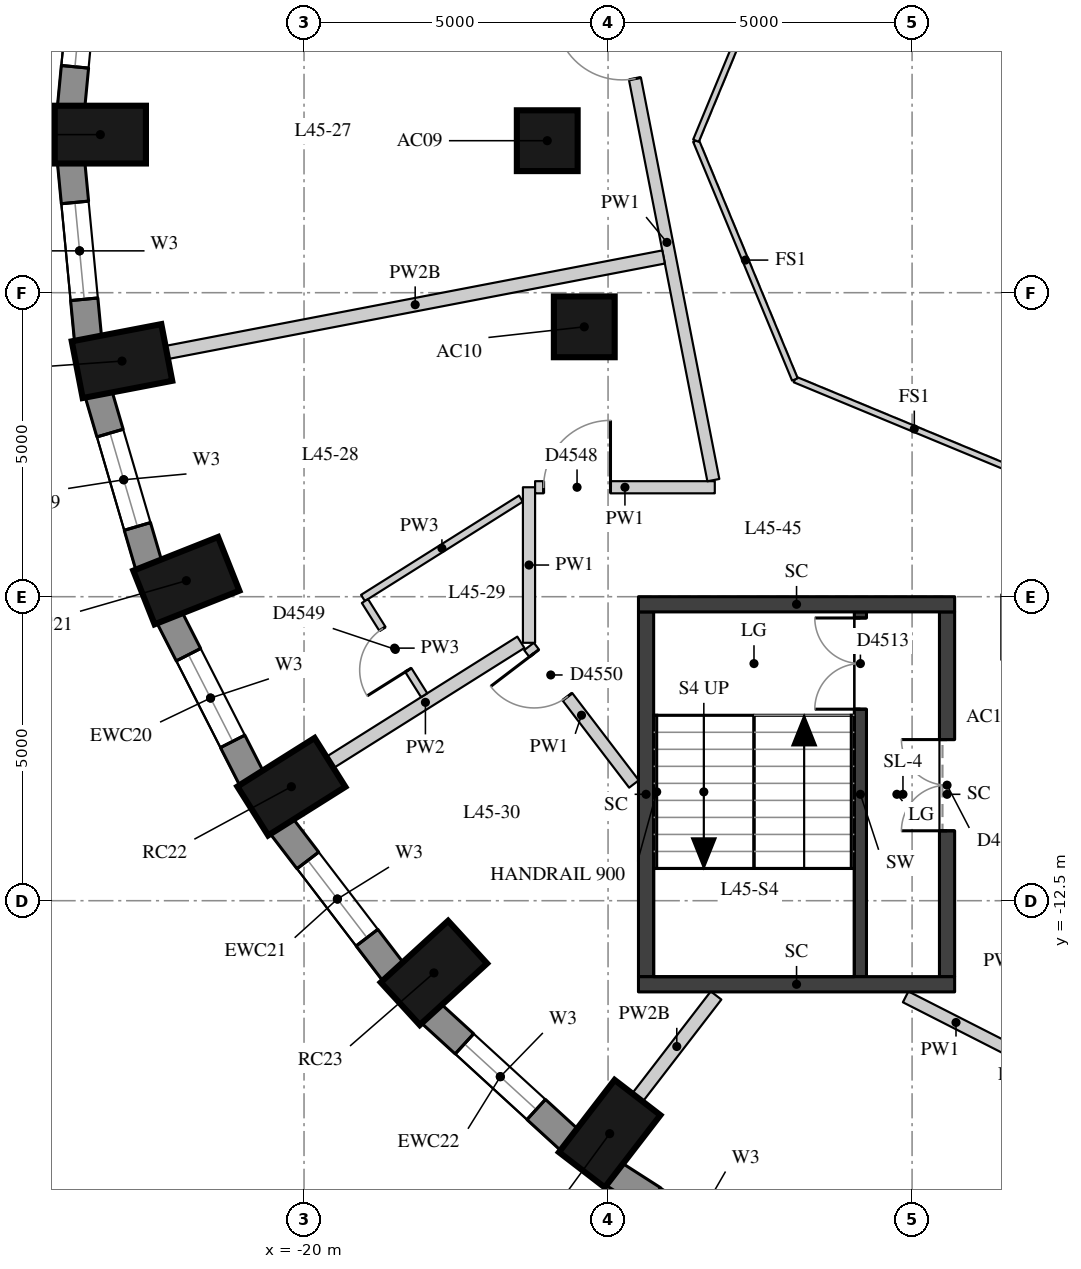
"""IFC4 building model, lengths in metres.
Left out: names, types, materials, properties, quantities, classifications, styles, units other than length and angle.
Written with IfcOpenShell. Run it as: python <this file> out.ifc"""

import sys

from ifc_helpers import new_model, si_unit, direction, frame, frame_2d, origin, origin_2d, place, context, subcontext, project, spatial, rectangle, extrude, element, fill, save


model = new_model("IFC4")
c1 = context("Model", 3, precision=1e-05, world=origin(), true_north=direction((0.0, 1.0)))
c2 = subcontext(c1, "Body", "Model", "MODEL_VIEW")
j1 = project(units=[si_unit("LENGTHUNIT", "METRE"), si_unit("PLANEANGLEUNIT", "RADIAN")], contexts=[c1])
p1 = place(None, origin())
s1 = spatial("IfcSite", under=j1, at=p1, CompositionType="ELEMENT")
p2 = place(p1, origin())
s2 = spatial("IfcBuilding", under=s1, at=p2, CompositionType="ELEMENT")
p3 = place(p2, frame((0.0, 0.0, 161.6)))
s3 = spatial("IfcBuildingStorey", under=s2, at=p3, CompositionType="ELEMENT", Elevation=161.6)
for number, where, z_axis, x_axis in (
    (1, (-23.35, 0.1, 0.0), (0.0, 0.0, 1.0), (-1.0, 0.0, 0.0)),
    (2, (-22.994, -3.625, 0.0), (0.0, 0.0, 1.0), (-0.982, -0.189, 0.0)),
    (3, (-21.936, -7.236, 0.0), (0.0, 0.0, 1.0), (-0.93, -0.369, 0.0)),
    (4, (-20.208, -10.625, 0.0), (0.0, 0.0, 1.0), (-0.846, -0.533, 0.0)),
    (5, (-17.864, -13.688, 0.0), (0.0, 0.0, 1.0), (-0.738, -0.675, 0.0)),
    (6, (-14.973, -16.332, 0.0), (0.0, 0.0, 1.0), (-0.61, -0.792, 0.0)),
):
    element("IfcColumn", number, at=place(p3, frame(where, z_axis=z_axis, x_axis=x_axis)), inside=s3, PredefinedType="COLUMN", context=c2, shape_type="SweptSolid", body=[
        extrude(rectangle(XDim=1.5, YDim=0.95, at=origin_2d()), origin(), (0.0, 0.0, 1.0), 3.3),
    ])
for number, where, z_axis, x_axis in (
    (7, (-16.0, 0.0, 0.0), (0.0, 0.0, 1.0), (1.0, 0.0, 0.0)),
    (8, (-15.391, -3.062, 0.0), (0.0, 0.0, 1.0), (1.0, 0.0, 0.0)),
):
    element("IfcColumn", number, at=place(p3, frame(where, z_axis=z_axis, x_axis=x_axis)), inside=s3, PredefinedType="COLUMN", context=c2, shape_type="SweptSolid", body=[
        extrude(rectangle(XDim=1.0, YDim=1.0, at=origin_2d()), origin(), (0.0, 0.0, 1.0), 3.3),
    ])
p4 = place(p3, frame((-23.552, 3.469, 0.0), z_axis=(0.0, 0.0, 1.0), x_axis=(-0.095265737322, -0.995451876935, 0.0)))
e9 = element("IfcWall", 9, at=p4, inside=s3, PredefinedType="SOLIDWALL", context=c2, shape_type="SweptSolid", body=[
    extrude(rectangle(XDim=2.927, YDim=0.45, at=frame_2d((1.463, 0.0))), origin(), (0.0, 0.0, 1.0), 3.02),
])
p5 = place(p4, frame((0.663, 0.0, 0.4)))
e10 = element("IfcOpeningElement", 10, at=p5, cuts=e9, PredefinedType="OPENING", context=c2, shape_type="SweptSolid", body=[
    extrude(rectangle(XDim=1.6, YDim=1.75, at=frame_2d((0.8, 0.875))), frame((0.0, 0.235, 0.0), z_axis=(0.0, -1.0, 0.0), x_axis=(1.0, 0.0, 0.0)), (0.0, 0.0, 1.0), 0.47),
])
p6 = place(p3, frame((-23.831, -0.355, 0.0), z_axis=(0.0, 0.0, 1.0), x_axis=(0.095257827044, -0.995452633924, 0.0)))
e11 = element("IfcWall", 11, at=p6, inside=s3, PredefinedType="SOLIDWALL", context=c2, shape_type="SweptSolid", body=[
    extrude(rectangle(XDim=2.927, YDim=0.45, at=frame_2d((1.463, 0.0))), origin(), (0.0, 0.0, 1.0), 3.02),
])
p7 = place(p6, frame((0.663, 0.0, 0.4)))
e12 = element("IfcOpeningElement", 12, at=p7, cuts=e11, PredefinedType="OPENING", context=c2, shape_type="SweptSolid", body=[
    extrude(rectangle(XDim=1.6, YDim=1.75, at=frame_2d((0.8, 0.875))), frame((0.0, 0.235, 0.0), z_axis=(0.0, -1.0, 0.0), x_axis=(1.0, 0.0, 0.0)), (0.0, 0.0, 1.0), 0.47),
])
p8 = place(p3, frame((-23.38, -4.162, 0.0), z_axis=(0.0, 0.0, 1.0), x_axis=(0.281125768296, -0.959670934435, 0.0)))
e13 = element("IfcWall", 13, at=p8, inside=s3, PredefinedType="SOLIDWALL", context=c2, shape_type="SweptSolid", body=[
    extrude(rectangle(XDim=2.948, YDim=0.45, at=frame_2d((1.474, 0.0))), origin(), (0.0, 0.0, 1.0), 3.02),
])
p9 = place(p8, frame((0.674, 0.0, 0.4)))
e14 = element("IfcOpeningElement", 14, at=p9, cuts=e13, PredefinedType="OPENING", context=c2, shape_type="SweptSolid", body=[
    extrude(rectangle(XDim=1.6, YDim=1.75, at=frame_2d((0.8, 0.875))), frame((0.0, 0.235, 0.0), z_axis=(0.0, -1.0, 0.0), x_axis=(1.0, 0.0, 0.0)), (0.0, 0.0, 1.0), 0.47),
])
p10 = place(p3, frame((-22.215, -7.837, 0.0), z_axis=(0.0, 0.0, 1.0), x_axis=(0.454133999889, -0.890933392653, 0.0)))
e15 = element("IfcWall", 15, at=p10, inside=s3, PredefinedType="SOLIDWALL", context=c2, shape_type="SweptSolid", body=[
    extrude(rectangle(XDim=2.986, YDim=0.45, at=frame_2d((1.493, 0.0))), origin(), (0.0, 0.0, 1.0), 3.02),
])
p11 = place(p10, frame((0.693, 0.0, 0.4)))
e16 = element("IfcOpeningElement", 16, at=p11, cuts=e15, PredefinedType="OPENING", context=c2, shape_type="SweptSolid", body=[
    extrude(rectangle(XDim=1.6, YDim=1.75, at=frame_2d((0.8, 0.875))), frame((0.0, 0.235, 0.0), z_axis=(0.0, -1.0, 0.0), x_axis=(1.0, 0.0, 0.0)), (0.0, 0.0, 1.0), 0.47),
])
p12 = place(p3, frame((-20.374, -11.267, 0.0), z_axis=(0.0, 0.0, 1.0), x_axis=(0.607817056371, -0.794077090706, 0.0)))
e17 = element("IfcWall", 17, at=p12, inside=s3, PredefinedType="SOLIDWALL", context=c2, shape_type="SweptSolid", body=[
    extrude(rectangle(XDim=3.037, YDim=0.45, at=frame_2d((1.519, 0.0))), origin(), (0.0, 0.0, 1.0), 3.02),
])
p13 = place(p12, frame((0.719, 0.0, 0.4)))
e18 = element("IfcOpeningElement", 18, at=p13, cuts=e17, PredefinedType="OPENING", context=c2, shape_type="SweptSolid", body=[
    extrude(rectangle(XDim=1.6, YDim=1.75, at=frame_2d((0.8, 0.875))), frame((0.0, 0.235, 0.0), z_axis=(0.0, -1.0, 0.0), x_axis=(1.0, 0.0, 0.0)), (0.0, 0.0, 1.0), 0.47),
])
p14 = place(p3, frame((-17.913, -14.35, 0.0), z_axis=(0.0, 0.0, 1.0), x_axis=(0.737808755941, -0.675009807082, 0.0)))
e19 = element("IfcWall", 19, at=p14, inside=s3, PredefinedType="SOLIDWALL", context=c2, shape_type="SweptSolid", body=[
    extrude(rectangle(XDim=3.094, YDim=0.45, at=frame_2d((1.547, 0.0))), origin(), (0.0, 0.0, 1.0), 3.02),
])
p15 = place(p14, frame((0.747, 0.0, 0.4)))
e20 = element("IfcOpeningElement", 20, at=p15, cuts=e19, PredefinedType="OPENING", context=c2, shape_type="SweptSolid", body=[
    extrude(rectangle(XDim=1.6, YDim=1.75, at=frame_2d((0.8, 0.875))), frame((0.0, 0.235, 0.0), z_axis=(0.0, -1.0, 0.0), x_axis=(1.0, 0.0, 0.0)), (0.0, 0.0, 1.0), 0.47),
])
p16 = place(p3, frame((-14.908, -16.993, 0.0), z_axis=(0.0, 0.0, 1.0), x_axis=(0.842065914439, -0.539374633943, 0.0)))
e21 = element("IfcWall", 21, at=p16, inside=s3, PredefinedType="SOLIDWALL", context=c2, shape_type="SweptSolid", body=[
    extrude(rectangle(XDim=3.151, YDim=0.45, at=frame_2d((1.576, 0.0))), origin(), (0.0, 0.0, 1.0), 3.02),
])
p17 = place(p16, frame((0.776, 0.0, 0.4)))
e22 = element("IfcOpeningElement", 22, at=p17, cuts=e21, PredefinedType="OPENING", context=c2, shape_type="SweptSolid", body=[
    extrude(rectangle(XDim=1.6, YDim=1.75, at=frame_2d((0.8, 0.875))), frame((0.0, 0.235, 0.0), z_axis=(0.0, -1.0, 0.0), x_axis=(1.0, 0.0, 0.0)), (0.0, 0.0, 1.0), 0.47),
])
p18 = place(p3, frame((-10.85, -13.75, 0.0), z_axis=(0.0, 0.0, 1.0), x_axis=(0.0, 1.0, 0.0)))
e23 = element("IfcWall", 23, at=p18, inside=s3, PredefinedType="SHEAR", context=c2, shape_type="SweptSolid", body=[
    extrude(rectangle(XDim=6.0, YDim=0.2, at=frame_2d((3.0, 0.0))), origin(), (0.0, 0.0, 1.0), 3.02),
])
p19 = place(p18, frame((4.4, 0.0, 0.0)))
e24 = element("IfcOpeningElement", 24, at=p19, cuts=e23, PredefinedType="OPENING", context=c2, shape_type="SweptSolid", body=[
    extrude(rectangle(XDim=1.5, YDim=2.1, at=frame_2d((0.75, 1.05))), frame((0.0, 0.11, 0.0), z_axis=(0.0, -1.0, 0.0), x_axis=(1.0, 0.0, 0.0)), (0.0, 0.0, 1.0), 0.22),
])
p20 = place(p3, frame((-14.375, -13.75, -0.28), z_axis=(0.0, 0.0, 1.0), x_axis=(0.0, 1.0, 0.0)))
e25 = element("IfcWall", 25, at=p20, inside=s3, PredefinedType="SHEAR", context=c2, shape_type="SweptSolid", body=[
    extrude(rectangle(XDim=6.0, YDim=0.25, at=frame_2d((3.0, 0.0))), origin(), (0.0, 0.0, 1.0), 3.3),
])
p21 = place(p3, frame((-9.425, -13.75, -0.28), z_axis=(0.0, 0.0, 1.0), x_axis=(0.0, 1.0, 0.0)))
e26 = element("IfcWall", 26, at=p21, inside=s3, PredefinedType="SHEAR", context=c2, shape_type="SweptSolid", body=[
    extrude(rectangle(XDim=6.0, YDim=0.25, at=frame_2d((3.0, 0.0))), origin(), (0.0, 0.0, 1.0), 3.3),
])
p22 = place(p21, frame((2.4, 0.0, 0.28)))
e27 = element("IfcOpeningElement", 27, at=p22, cuts=e26, PredefinedType="OPENING", context=c2, shape_type="SweptSolid", body=[
    extrude(rectangle(XDim=1.5, YDim=2.1, at=frame_2d((0.75, 1.05))), frame((0.0, 0.135, 0.0), z_axis=(0.0, -1.0, 0.0), x_axis=(1.0, 0.0, 0.0)), (0.0, 0.0, 1.0), 0.27),
])
for number, where, z_axis, x_axis in (
    (28, (-14.5, -7.625, -0.28), (0.0, 0.0, 1.0), (1.0, 0.0, 0.0)),
    (29, (-14.5, -13.875, -0.28), (0.0, 0.0, 1.0), (1.0, 0.0, 0.0)),
):
    element("IfcWall", number, at=place(p3, frame(where, z_axis=z_axis, x_axis=x_axis)), inside=s3, PredefinedType="SHEAR", context=c2, shape_type="SweptSolid", body=[
        extrude(rectangle(XDim=5.2, YDim=0.25, at=frame_2d((2.6, 0.0))), origin(), (0.0, 0.0, 1.0), 3.3),
    ])
p23 = place(p3, frame((-8.449, -14.925, 0.0), z_axis=(0.0, 0.0, 1.0), x_axis=(-0.891172770552, 0.45366407509, 0.0)))
e30 = element("IfcWall", 30, at=p23, inside=s3, PredefinedType="PARTITIONING", context=c2, shape_type="SweptSolid", body=[
    extrude(rectangle(XDim=1.859, YDim=0.2, at=frame_2d((0.929, 0.0))), origin(), (0.0, 0.0, 1.0), 3.02),
])
p24 = place(p3, frame((-14.574, -10.58, 0.0), z_axis=(0.0, 0.0, 1.0), x_axis=(-0.606733250298, 0.794905505694, 0.0)))
e31 = element("IfcWall", 31, at=p24, inside=s3, PredefinedType="PARTITIONING", context=c2, shape_type="SweptSolid", body=[
    extrude(rectangle(XDim=2.845, YDim=0.2, at=frame_2d((1.423, 0.0))), origin(), (0.0, 0.0, 1.0), 3.02),
])
p25 = place(p24, frame((1.805, 0.0, 0.0)))
e32 = element("IfcOpeningElement", 32, at=p25, cuts=e31, PredefinedType="OPENING", context=c2, shape_type="SweptSolid", body=[
    extrude(rectangle(XDim=0.9, YDim=2.1, at=frame_2d((0.45, 1.05))), frame((0.0, 0.11, 0.0), z_axis=(0.0, -1.0, 0.0), x_axis=(1.0, 0.0, 0.0)), (0.0, 0.0, 1.0), 0.22),
])
p26 = place(p3, frame((-16.3, -8.258, 0.0), z_axis=(0.0, 0.0, 1.0), x_axis=(0.0, 1.0, 0.0)))
e33 = element("IfcWall", 33, at=p26, inside=s3, PredefinedType="PARTITIONING", context=c2, shape_type="SweptSolid", body=[
    extrude(rectangle(XDim=2.558, YDim=0.2, at=frame_2d((1.279, 0.0))), origin(), (0.0, 0.0, 1.0), 3.02),
])
p27 = place(p3, frame((-16.2, -5.7, 0.0), z_axis=(0.0, 0.0, 1.0), x_axis=(1.0, 0.0, 0.0)))
e34 = element("IfcWall", 34, at=p27, inside=s3, PredefinedType="PARTITIONING", context=c2, shape_type="SweptSolid", body=[
    extrude(rectangle(XDim=2.955, YDim=0.2, at=frame_2d((1.478, 0.0))), origin(), (0.0, 0.0, 1.0), 3.02),
])
p28 = place(p27, frame((0.14, 0.0, 0.0)))
e35 = element("IfcOpeningElement", 35, at=p28, cuts=e34, PredefinedType="OPENING", context=c2, shape_type="SweptSolid", body=[
    extrude(rectangle(XDim=1.1, YDim=2.1, at=frame_2d((0.55, 1.05))), frame((0.0, 0.11, 0.0), z_axis=(0.0, -1.0, 0.0), x_axis=(1.0, 0.0, 0.0)), (0.0, 0.0, 1.0), 0.22),
])
p29 = place(p3, frame((-13.268, -5.583, 0.0), z_axis=(0.0, 0.0, 1.0), x_axis=(-0.191747927029, 0.981444207523, 0.0)))
e36 = element("IfcWall", 36, at=p29, inside=s3, PredefinedType="PARTITIONING", context=c2, shape_type="SweptSolid", body=[
    extrude(rectangle(XDim=7.968, YDim=0.2, at=frame_2d((3.984, 0.0))), origin(), (0.0, 0.0, 1.0), 3.02),
])
p30 = place(p29, frame((6.728, 0.0, 0.0)))
e37 = element("IfcOpeningElement", 37, at=p30, cuts=e36, PredefinedType="OPENING", context=c2, shape_type="SweptSolid", body=[
    extrude(rectangle(XDim=1.1, YDim=2.1, at=frame_2d((0.55, 1.05))), frame((0.0, 0.11, 0.0), z_axis=(0.0, -1.0, 0.0), x_axis=(1.0, 0.0, 0.0)), (0.0, 0.0, 1.0), 0.22),
])
p31 = place(p3, frame((-22.257, -3.483, 0.0), z_axis=(0.0, 0.0, 1.0), x_axis=(0.982022559039, 0.188763591666, 0.0)))
e38 = element("IfcWall", 38, at=p31, inside=s3, PredefinedType="PARTITIONING", context=c2, shape_type="SweptSolid", body=[
    extrude(rectangle(XDim=8.32, YDim=0.22, at=frame_2d((4.16, 0.0))), origin(), (0.0, 0.0, 1.0), 2.57),
])
p32 = place(p3, frame((-19.573, -10.226, 0.0), z_axis=(0.0, 0.0, 1.0), x_axis=(0.846352613514, 0.53262299387, 0.0)))
e39 = element("IfcWall", 39, at=p32, inside=s3, PredefinedType="PARTITIONING", context=c2, shape_type="SweptSolid", body=[
    extrude(rectangle(XDim=3.71, YDim=0.22, at=frame_2d((1.855, 0.0))), origin(), (0.0, 0.0, 1.0), 3.02),
])
p33 = place(p3, frame((-14.516, -15.737, 0.0), z_axis=(0.0, 0.0, 1.0), x_axis=(0.609983624648, 0.792414019097, 0.0)))
e40 = element("IfcWall", 40, at=p33, inside=s3, PredefinedType="PARTITIONING", context=c2, shape_type="SweptSolid", body=[
    extrude(rectangle(XDim=2.118, YDim=0.22, at=frame_2d((1.059, 0.0))), origin(), (0.0, 0.0, 1.0), 2.57),
])
p34 = place(p3, frame((-16.434, -5.887, 0.0), z_axis=(0.0, 0.0, 1.0), x_axis=(-0.846389599206, -0.532564218058, 0.0)))
e41 = element("IfcWall", 41, at=p34, inside=s3, PredefinedType="PARTITIONING", context=c2, shape_type="SweptSolid", body=[
    extrude(rectangle(XDim=3.068, YDim=0.12, at=frame_2d((1.534, 0.0))), origin(), (0.0, 0.0, 1.0), 3.02),
])
p35 = place(p3, frame((-18.999, -7.571, 0.0), z_axis=(0.0, 0.0, 1.0), x_axis=(0.532431076319, -0.84647335987, 0.0)))
e42 = element("IfcWall", 42, at=p35, inside=s3, PredefinedType="PARTITIONING", context=c2, shape_type="SweptSolid", body=[
    extrude(rectangle(XDim=1.83, YDim=0.12, at=frame_2d((0.915, 0.0))), origin(), (0.0, 0.0, 1.0), 3.02),
])
p36 = place(p35, frame((0.54, 0.0, 0.0)))
e43 = element("IfcOpeningElement", 43, at=p36, cuts=e42, PredefinedType="OPENING", context=c2, shape_type="SweptSolid", body=[
    extrude(rectangle(XDim=0.8, YDim=2.1, at=frame_2d((0.4, 1.05))), frame((0.0, 0.07, 0.0), z_axis=(0.0, -1.0, 0.0), x_axis=(1.0, 0.0, 0.0)), (0.0, 0.0, 1.0), 0.14),
])
for number, where, z_axis, x_axis in (
    (44, (-8.0, -5.554, 0.0), (0.0, 0.0, 1.0), (-0.924, 0.383, 0.0)),
    (45, (-11.927, -3.927, 0.0), (0.0, 0.0, 1.0), (-0.383, 0.924, 0.0)),
    (46, (-13.554, 0.0, 0.0), (0.0, 0.0, 1.0), (0.383, 0.924, 0.0)),
):
    element("IfcWall", number, at=place(p3, frame(where, z_axis=z_axis, x_axis=x_axis)), inside=s3, PredefinedType="PARTITIONING", context=c2, shape_type="SweptSolid", body=[
        extrude(rectangle(XDim=4.251, YDim=0.1, at=frame_2d((2.125, 0.0))), origin(), (0.0, 0.0, 1.0), 3.02),
    ])
p37 = place(p5, origin())
e47 = element("IfcWindow", 47, at=p37, inside=s3, PartitioningType="SINGLE_PANEL", PredefinedType="WINDOW", context=c2, shape_type="SweptSolid", body=[
    extrude(rectangle(XDim=1.6, YDim=1.75, at=frame_2d((0.8, 0.875))), frame((0.0, 0.035, 0.0), z_axis=(0.0, -1.0, 0.0), x_axis=(1.0, 0.0, 0.0)), (0.0, 0.0, 1.0), 0.06),
])
fill(e10, e47)
p38 = place(p7, origin())
e48 = element("IfcWindow", 48, at=p38, inside=s3, PartitioningType="SINGLE_PANEL", PredefinedType="WINDOW", context=c2, shape_type="SweptSolid", body=[
    extrude(rectangle(XDim=1.6, YDim=1.75, at=frame_2d((0.8, 0.875))), frame((0.0, 0.035, 0.0), z_axis=(0.0, -1.0, 0.0), x_axis=(1.0, 0.0, 0.0)), (0.0, 0.0, 1.0), 0.06),
])
fill(e12, e48)
p39 = place(p9, origin())
e49 = element("IfcWindow", 49, at=p39, inside=s3, PartitioningType="SINGLE_PANEL", PredefinedType="WINDOW", context=c2, shape_type="SweptSolid", body=[
    extrude(rectangle(XDim=1.6, YDim=1.75, at=frame_2d((0.8, 0.875))), frame((0.0, 0.035, 0.0), z_axis=(0.0, -1.0, 0.0), x_axis=(1.0, 0.0, 0.0)), (0.0, 0.0, 1.0), 0.06),
])
fill(e14, e49)
p40 = place(p11, origin())
e50 = element("IfcWindow", 50, at=p40, inside=s3, PartitioningType="SINGLE_PANEL", PredefinedType="WINDOW", context=c2, shape_type="SweptSolid", body=[
    extrude(rectangle(XDim=1.6, YDim=1.75, at=frame_2d((0.8, 0.875))), frame((0.0, 0.035, 0.0), z_axis=(0.0, -1.0, 0.0), x_axis=(1.0, 0.0, 0.0)), (0.0, 0.0, 1.0), 0.06),
])
fill(e16, e50)
p41 = place(p13, origin())
e51 = element("IfcWindow", 51, at=p41, inside=s3, PartitioningType="SINGLE_PANEL", PredefinedType="WINDOW", context=c2, shape_type="SweptSolid", body=[
    extrude(rectangle(XDim=1.6, YDim=1.75, at=frame_2d((0.8, 0.875))), frame((0.0, 0.035, 0.0), z_axis=(0.0, -1.0, 0.0), x_axis=(1.0, 0.0, 0.0)), (0.0, 0.0, 1.0), 0.06),
])
fill(e18, e51)
p42 = place(p15, origin())
e52 = element("IfcWindow", 52, at=p42, inside=s3, PartitioningType="SINGLE_PANEL", PredefinedType="WINDOW", context=c2, shape_type="SweptSolid", body=[
    extrude(rectangle(XDim=1.6, YDim=1.75, at=frame_2d((0.8, 0.875))), frame((0.0, 0.035, 0.0), z_axis=(0.0, -1.0, 0.0), x_axis=(1.0, 0.0, 0.0)), (0.0, 0.0, 1.0), 0.06),
])
fill(e20, e52)
p43 = place(p19, origin())
e53 = element("IfcDoor", 53, at=p43, inside=s3, OperationType="DOUBLE_DOOR_SINGLE_SWING", PredefinedType="DOOR", context=c2, shape_type="SweptSolid", body=[
    extrude(rectangle(XDim=1.5, YDim=2.1, at=frame_2d((0.75, 1.05))), frame((0.0, 0.025, 0.0), z_axis=(0.0, -1.0, 0.0), x_axis=(1.0, 0.0, 0.0)), (0.0, 0.0, 1.0), 0.05),
])
fill(e24, e53)
p44 = place(p22, origin())
e54 = element("IfcDoor", 54, at=p44, inside=s3, OperationType="DOUBLE_DOOR_SINGLE_SWING", PredefinedType="DOOR", context=c2, shape_type="SweptSolid", body=[
    extrude(rectangle(XDim=1.5, YDim=2.1, at=frame_2d((0.75, 1.05))), frame((0.0, 0.025, 0.0), z_axis=(0.0, -1.0, 0.0), x_axis=(1.0, 0.0, 0.0)), (0.0, 0.0, 1.0), 0.05),
])
fill(e27, e54)
p45 = place(p30, origin())
e55 = element("IfcDoor", 55, at=p45, inside=s3, OperationType="SINGLE_SWING_RIGHT", PredefinedType="DOOR", context=c2, shape_type="SweptSolid", body=[
    extrude(rectangle(XDim=1.1, YDim=2.1, at=frame_2d((0.55, 1.05))), frame((0.0, 0.025, 0.0), z_axis=(0.0, -1.0, 0.0), x_axis=(1.0, 0.0, 0.0)), (0.0, 0.0, 1.0), 0.05),
])
fill(e37, e55)
p46 = place(p28, origin())
e56 = element("IfcDoor", 56, at=p46, inside=s3, OperationType="SINGLE_SWING_RIGHT", PredefinedType="DOOR", context=c2, shape_type="SweptSolid", body=[
    extrude(rectangle(XDim=1.1, YDim=2.1, at=frame_2d((0.55, 1.05))), frame((0.0, 0.025, 0.0), z_axis=(0.0, -1.0, 0.0), x_axis=(1.0, 0.0, 0.0)), (0.0, 0.0, 1.0), 0.05),
])
fill(e35, e56)
p47 = place(p36, origin())
e57 = element("IfcDoor", 57, at=p47, inside=s3, OperationType="SINGLE_SWING_LEFT", PredefinedType="DOOR", context=c2, shape_type="SweptSolid", body=[
    extrude(rectangle(XDim=0.8, YDim=2.1, at=frame_2d((0.4, 1.05))), frame((0.0, 0.025, 0.0), z_axis=(0.0, -1.0, 0.0), x_axis=(1.0, 0.0, 0.0)), (0.0, 0.0, 1.0), 0.05),
])
fill(e43, e57)
p48 = place(p25, origin())
e58 = element("IfcDoor", 58, at=p48, inside=s3, OperationType="SINGLE_SWING_RIGHT", PredefinedType="DOOR", context=c2, shape_type="SweptSolid", body=[
    extrude(rectangle(XDim=0.9, YDim=2.1, at=frame_2d((0.45, 1.05))), frame((0.0, 0.025, 0.0), z_axis=(0.0, -1.0, 0.0), x_axis=(1.0, 0.0, 0.0)), (0.0, 0.0, 1.0), 0.05),
])
fill(e32, e58)
save(model, sys.argv[1])
